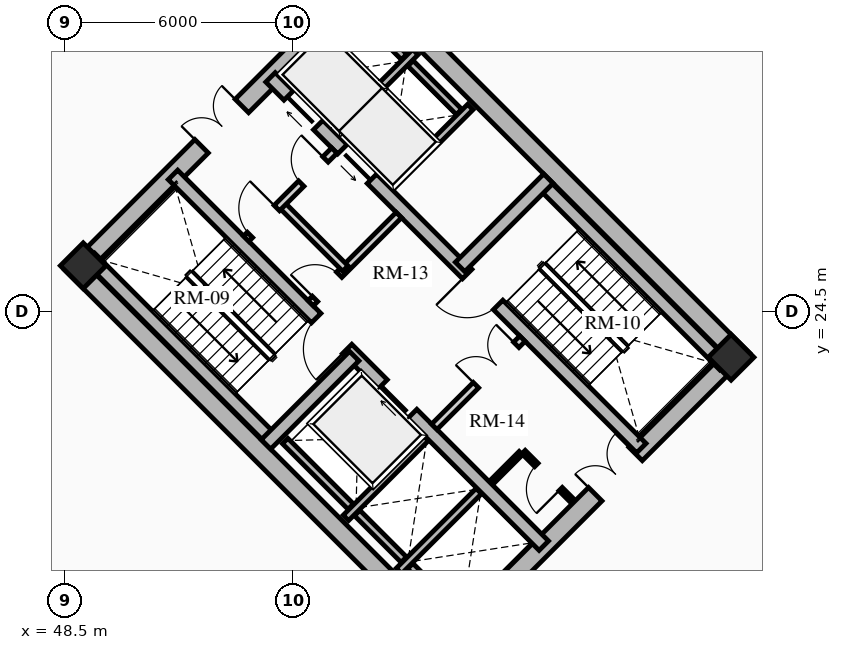
"""IFC4 building model, lengths in metres.
Left out: names, types, materials, properties, quantities, classifications, styles, units other than length and angle.
Written with IfcOpenShell. Run it as: python <this file> out.ifc"""

import sys

from ifc_helpers import new_model, si_unit, direction, frame, frame_2d, origin, origin_2d, place, context, subcontext, project, spatial, rectangle, extrude, source, transform, mapped, element, fill, save


model = new_model("IFC4")
c1 = context("Model", 3, precision=1e-05, world=origin(), true_north=direction((0.0, 1.0)))
c2 = subcontext(c1, "Body", "Model", "MODEL_VIEW")
j1 = project(units=[si_unit("LENGTHUNIT", "METRE"), si_unit("PLANEANGLEUNIT", "RADIAN")], contexts=[c1])
p1 = place(None, origin())
s1 = spatial("IfcSite", under=j1, at=p1, CompositionType="ELEMENT")
p2 = place(p1, origin())
s2 = spatial("IfcBuilding", under=s1, at=p2, CompositionType="ELEMENT")
p3 = place(p2, frame((0.0, 0.0, 9.0)))
s3 = spatial("IfcBuildingStorey", under=s2, at=p3, CompositionType="ELEMENT", Elevation=9.0)
for number, where, z_axis, x_axis in (
    (1, (58.773, 15.661, 0.0), (0.0, 0.0, 1.0), (-0.707, 0.707, 0.0)),
    (2, (66.339, 23.227, 0.0), (0.0, 0.0, 1.0), (-0.707, 0.707, 0.0)),
):
    element("IfcWall", number, at=place(p3, frame(where, z_axis=z_axis, x_axis=x_axis)), inside=s3, PredefinedType="SHEAR", context=c2, shape_type="SweptSolid", body=[
        extrude(rectangle(XDim=14.3, YDim=0.5, at=frame_2d((7.15, 0.0))), origin(), (0.0, 0.0, 1.0), 4.2),
    ])
p4 = place(p3, frame((58.596, 15.838, 0.0), z_axis=(0.0, 0.0, 1.0), x_axis=(0.707106781187, 0.707106781187, 0.0)))
e3 = element("IfcWall", 3, at=p4, inside=s3, PredefinedType="SHEAR", context=c2, shape_type="SweptSolid", body=[
    extrude(rectangle(XDim=10.7, YDim=0.5, at=frame_2d((5.35, 0.0))), origin(), (0.0, 0.0, 1.0), 4.2),
])
m1 = source(origin(), c2, "Body", "SweptSolid", [
    extrude(rectangle(XDim=1.5, YDim=2.02, at=frame_2d((0.75, 1.01))), frame((0.0, 0.26, 0.0), z_axis=(0.0, -1.0, 0.0), x_axis=(1.0, 0.0, 0.0)), (0.0, 0.0, 1.0), 0.52),
])
p5 = place(p4, frame((5.45, 0.0, 0.0)))
e4 = element("IfcOpeningElement", 4, at=p5, cuts=e3, PredefinedType="OPENING", context=c2, shape_type="MappedRepresentation", body=[
    mapped(m1, transform((0.0, 0.0, 0.0), x_axis=(1.0, 0.0, 0.0), y_axis=(0.0, 1.0, 0.0), z_axis=(0.0, 0.0, 1.0), scale=1.0)),
])
p6 = place(p3, frame((48.838, 25.596, 0.0), z_axis=(0.0, 0.0, 1.0), x_axis=(0.707106781187, 0.707106781187, 0.0)))
e5 = element("IfcWall", 5, at=p6, inside=s3, PredefinedType="SHEAR", context=c2, shape_type="SweptSolid", body=[
    extrude(rectangle(XDim=10.7, YDim=0.5, at=frame_2d((5.35, 0.0))), origin(), (0.0, 0.0, 1.0), 4.2),
])
p7 = place(p6, frame((4.6, 0.0, 0.0)))
e6 = element("IfcOpeningElement", 6, at=p7, cuts=e5, PredefinedType="OPENING", context=c2, shape_type="MappedRepresentation", body=[
    mapped(m1, transform((0.0, 0.0, 0.0), x_axis=(1.0, 0.0, 0.0), y_axis=(0.0, 1.0, 0.0), z_axis=(0.0, 0.0, 1.0), scale=1.0)),
])
p8 = place(p3, frame((61.096, 18.338, 0.0), z_axis=(0.0, 0.0, 1.0), x_axis=(-0.707106781187, 0.707106781187, 0.0)))
e7 = element("IfcWall", 7, at=p8, inside=s3, PredefinedType="SHEAR", context=c2, shape_type="SweptSolid", body=[
    extrude(rectangle(XDim=13.8, YDim=0.35, at=frame_2d((6.9, 0.0))), origin(), (0.0, 0.0, 1.0), 4.2),
])
m2 = source(origin(), c2, "Body", "SweptSolid", [
    extrude(rectangle(XDim=1.1, YDim=2.015, at=frame_2d((0.55, 1.007))), frame((0.0, 0.185, 0.0), z_axis=(0.0, -1.0, 0.0), x_axis=(1.0, 0.0, 0.0)), (0.0, 0.0, 1.0), 0.37),
])
p9 = place(p8, frame((4.9, 0.0, 0.0)))
e8 = element("IfcOpeningElement", 8, at=p9, cuts=e7, PredefinedType="OPENING", context=c2, shape_type="MappedRepresentation", body=[
    mapped(m2, transform((0.0, 0.0, 0.0), x_axis=(1.0, 0.0, 0.0), y_axis=(0.0, 1.0, 0.0), z_axis=(0.0, 0.0, 1.0), scale=1.0)),
])
m3 = source(origin(), c2, "Body", "SweptSolid", [
    extrude(rectangle(XDim=1.15, YDim=2.02, at=frame_2d((0.575, 1.01))), frame((0.0, 0.185, 0.0), z_axis=(0.0, -1.0, 0.0), x_axis=(1.0, 0.0, 0.0)), (0.0, 0.0, 1.0), 0.37),
])
p10 = place(p8, frame((7.32, 0.0, 0.0)))
e9 = element("IfcOpeningElement", 9, at=p10, cuts=e7, PredefinedType="OPENING", context=c2, shape_type="MappedRepresentation", body=[
    mapped(m3, transform((0.0, 0.0, 0.0), x_axis=(1.0, 0.0, 0.0), y_axis=(0.0, 1.0, 0.0), z_axis=(0.0, 0.0, 1.0), scale=1.0)),
])
p11 = place(p3, frame((63.662, 20.904, 0.0), z_axis=(0.0, 0.0, 1.0), x_axis=(-0.707106781187, 0.707106781187, 0.0)))
e10 = element("IfcWall", 10, at=p11, inside=s3, PredefinedType="SHEAR", context=c2, shape_type="SweptSolid", body=[
    extrude(rectangle(XDim=13.8, YDim=0.35, at=frame_2d((6.9, 0.0))), origin(), (0.0, 0.0, 1.0), 4.2),
])
p12 = place(p11, frame((10.025, 0.0, 0.0)))
e11 = element("IfcOpeningElement", 11, at=p12, cuts=e10, PredefinedType="OPENING", context=c2, shape_type="MappedRepresentation", body=[
    mapped(m2, transform((0.0, 0.0, 0.0), x_axis=(1.0, 0.0, 0.0), y_axis=(0.0, 1.0, 0.0), z_axis=(0.0, 0.0, 1.0), scale=1.0)),
])
p13 = place(p11, frame((12.025, 0.0, 0.0)))
e12 = element("IfcOpeningElement", 12, at=p13, cuts=e10, PredefinedType="OPENING", context=c2, shape_type="MappedRepresentation", body=[
    mapped(m2, transform((0.0, 0.0, 0.0), x_axis=(1.0, 0.0, 0.0), y_axis=(0.0, 1.0, 0.0), z_axis=(0.0, 0.0, 1.0), scale=1.0)),
])
p14 = place(p11, frame((5.33, 0.0, 0.0)))
e13 = element("IfcOpeningElement", 13, at=p14, cuts=e10, PredefinedType="OPENING", context=c2, shape_type="MappedRepresentation", body=[
    mapped(m3, transform((0.0, 0.0, 0.0), x_axis=(1.0, 0.0, 0.0), y_axis=(0.0, 1.0, 0.0), z_axis=(0.0, 0.0, 1.0), scale=1.0)),
])
p15 = place(p3, frame((53.922, 21.141, 0.0), z_axis=(0.0, 0.0, 1.0), x_axis=(-0.707106781187, 0.707106781187, 0.0)))
e14 = element("IfcWall", 14, at=p15, inside=s3, PredefinedType="SHEAR", context=c2, shape_type="SweptSolid", body=[
    extrude(rectangle(XDim=6.745, YDim=0.35, at=frame_2d((3.373, 0.0))), origin(), (0.0, 0.0, 1.0), 4.2),
])
p16 = place(p3, frame((53.784, 21.003, 0.0), z_axis=(0.0, 0.0, 1.0), x_axis=(0.707106781187, 0.707106781187, 0.0)))
e15 = element("IfcWall", 15, at=p16, inside=s3, PredefinedType="SHEAR", context=c2, shape_type="SweptSolid", body=[
    extrude(rectangle(XDim=3.285, YDim=0.35, at=frame_2d((1.643, 0.0))), origin(), (0.0, 0.0, 1.0), 4.2),
])
p17 = place(p3, frame((65.847, 23.089, 0.0), z_axis=(0.0, 0.0, 1.0), x_axis=(-0.707106781187, 0.707106781187, 0.0)))
e16 = element("IfcWall", 16, at=p17, inside=s3, PredefinedType="SHEAR", context=c2, shape_type="SweptSolid", body=[
    extrude(rectangle(XDim=6.745, YDim=0.35, at=frame_2d((3.373, 0.0))), origin(), (0.0, 0.0, 1.0), 4.2),
])
p18 = place(p3, frame((58.893, 25.674, 0.0), z_axis=(0.0, 0.0, 1.0), x_axis=(0.707106781187, 0.707106781187, 0.0)))
e17 = element("IfcWall", 17, at=p18, inside=s3, PredefinedType="SHEAR", context=c2, shape_type="SweptSolid", body=[
    extrude(rectangle(XDim=3.285, YDim=0.35, at=frame_2d((1.643, 0.0))), origin(), (0.0, 0.0, 1.0), 4.2),
])
for number, where, z_axis, x_axis in (
    (18, (48.976, 25.706, 0.0), (0.0, 0.0, 1.0), (0.707, 0.707, 0.0)),
    (19, (66.024, 23.294, 0.0), (0.0, 0.0, 1.0), (0.707, 0.707, 0.0)),
):
    element("IfcColumn", number, at=place(p3, frame(where, z_axis=z_axis, x_axis=x_axis)), inside=s3, PredefinedType="COLUMN", context=c2, shape_type="SweptSolid", body=[
        extrude(rectangle(XDim=0.85, YDim=0.85, at=origin_2d()), origin(), (0.0, 0.0, 1.0), 4.2),
    ])
p19 = place(p3, frame((55.888, 19.069, 0.0), z_axis=(0.0, 0.0, 1.0), x_axis=(0.707106781187, 0.707106781187, 0.0)))
e20 = element("IfcWall", 20, at=p19, inside=s3, PredefinedType="SHEAR", context=c2, shape_type="SweptSolid", body=[
    extrude(rectangle(XDim=2.97, YDim=0.2, at=frame_2d((1.485, 0.0))), origin(), (0.0, 0.0, 1.0), 4.2),
])
p20 = place(p3, frame((56.015, 19.366, 0.0), z_axis=(0.0, 0.0, 1.0), x_axis=(-0.707106781187, 0.707106781187, 0.0)))
e21 = element("IfcWall", 21, at=p20, inside=s3, PredefinedType="SHEAR", context=c2, shape_type="SweptSolid", body=[
    extrude(rectangle(XDim=2.44, YDim=0.2, at=frame_2d((1.22, 0.0))), origin(), (0.0, 0.0, 1.0), 4.2),
])
p21 = place(p3, frame((57.284, 17.673, 0.0), z_axis=(0.0, 0.0, 1.0), x_axis=(0.707147878904, 0.70706568108, 0.0)))
e22 = element("IfcWall", 22, at=p21, inside=s3, PredefinedType="SHEAR", context=c2, shape_type="SweptSolid", body=[
    extrude(rectangle(XDim=2.97, YDim=0.2, at=frame_2d((1.485, 0.0))), origin(), (0.0, 0.0, 1.0), 4.2),
])
p22 = place(p3, frame((57.412, 17.97, 0.0), z_axis=(0.0, 0.0, 1.0), x_axis=(-0.707106781187, 0.707106781187, 0.0)))
e23 = element("IfcWall", 23, at=p22, inside=s3, PredefinedType="SHEAR", context=c2, shape_type="SweptSolid", body=[
    extrude(rectangle(XDim=1.735, YDim=0.2, at=frame_2d((0.867, 0.0))), origin(), (0.0, 0.0, 1.0), 4.2),
])
p23 = place(p3, frame((58.737, 16.644, 0.0), z_axis=(0.0, 0.0, 1.0), x_axis=(-0.707032117043, 0.707181437447, 0.0)))
e24 = element("IfcWall", 24, at=p23, inside=s3, PredefinedType="SHEAR", context=c2, shape_type="SweptSolid", body=[
    extrude(rectangle(XDim=1.635, YDim=0.2, at=frame_2d((0.817, 0.0))), origin(), (0.0, 0.0, 1.0), 4.2),
])
p24 = place(p3, frame((57.062, 27.781, 0.0), z_axis=(0.0, 0.0, 1.0), x_axis=(0.707106781187, 0.707106781187, 0.0)))
e25 = element("IfcWall", 25, at=p24, inside=s3, PredefinedType="SHEAR", context=c2, shape_type="SweptSolid", body=[
    extrude(rectangle(XDim=2.97, YDim=0.2, at=frame_2d((1.485, 0.0))), origin(), (0.0, 0.0, 1.0), 4.2),
])
p25 = place(p3, frame((55.615, 29.227, 0.0), z_axis=(0.0, 0.0, 1.0), x_axis=(0.707147878904, 0.70706568108, 0.0)))
e26 = element("IfcWall", 26, at=p25, inside=s3, PredefinedType="SHEAR", context=c2, shape_type="SweptSolid", body=[
    extrude(rectangle(XDim=2.97, YDim=0.2, at=frame_2d((1.485, 0.0))), origin(), (0.0, 0.0, 1.0), 4.2),
])
p26 = place(p3, frame((58.865, 29.754, 0.0), z_axis=(0.0, 0.0, 1.0), x_axis=(-0.707174411312, 0.707039144592, 0.0)))
e27 = element("IfcWall", 27, at=p26, inside=s3, PredefinedType="SHEAR", context=c2, shape_type="SweptSolid", body=[
    extrude(rectangle(XDim=1.805, YDim=0.2, at=frame_2d((0.902, 0.0))), origin(), (0.0, 0.0, 1.0), 4.2),
])
p27 = place(p3, frame((57.419, 31.2, 0.0), z_axis=(0.0, 0.0, 1.0), x_axis=(-0.707032117043, 0.707181437447, 0.0)))
e28 = element("IfcWall", 28, at=p27, inside=s3, PredefinedType="SHEAR", context=c2, shape_type="SweptSolid", body=[
    extrude(rectangle(XDim=1.635, YDim=0.2, at=frame_2d((0.817, 0.0))), origin(), (0.0, 0.0, 1.0), 4.2),
])
p28 = place(p3, frame((58.214, 21.467, 0.0), z_axis=(0.0, 0.0, 1.0), x_axis=(0.707106781187, 0.707106781187, 0.0)))
e29 = element("IfcWall", 29, at=p28, inside=s3, PredefinedType="PARTITIONING", context=c2, shape_type="SweptSolid", body=[
    extrude(rectangle(XDim=3.28, YDim=0.2, at=frame_2d((1.64, 0.0))), origin(), (0.0, 0.0, 1.0), 3.885),
])
m4 = source(origin(), c2, "Body", "SweptSolid", [
    extrude(rectangle(XDim=1.5, YDim=2.02, at=frame_2d((0.75, 1.01))), frame((0.0, 0.11, 0.0), z_axis=(0.0, -1.0, 0.0), x_axis=(1.0, 0.0, 0.0)), (0.0, 0.0, 1.0), 0.22),
])
p29 = place(p28, frame((1.55, 0.0, 0.0)))
e30 = element("IfcOpeningElement", 30, at=p29, cuts=e29, PredefinedType="OPENING", context=c2, shape_type="MappedRepresentation", body=[
    mapped(m4, transform((0.0, 0.0, 0.0), x_axis=(1.0, 0.0, 0.0), y_axis=(0.0, 1.0, 0.0), z_axis=(0.0, 0.0, 1.0), scale=1.0)),
])
p30 = place(p3, frame((54.961, 24.719, 0.0), z_axis=(0.0, 0.0, 1.0), x_axis=(0.707106781187, 0.707106781187, 0.0)))
e31 = element("IfcWall", 31, at=p30, inside=s3, PredefinedType="PARTITIONING", context=c2, shape_type="SweptSolid", body=[
    extrude(rectangle(XDim=3.28, YDim=0.2, at=frame_2d((1.64, 0.0))), origin(), (0.0, 0.0, 1.0), 3.885),
])
m5 = source(origin(), c2, "Body", "SweptSolid", [
    extrude(rectangle(XDim=0.9, YDim=2.005, at=frame_2d((0.45, 1.002))), frame((0.0, 0.11, 0.0), z_axis=(0.0, -1.0, 0.0), x_axis=(1.0, 0.0, 0.0)), (0.0, 0.0, 1.0), 0.22),
])
p31 = place(p30, frame((0.16, 0.0, 0.0)))
e32 = element("IfcOpeningElement", 32, at=p31, cuts=e31, PredefinedType="OPENING", context=c2, shape_type="MappedRepresentation", body=[
    mapped(m5, transform((0.0, 0.0, 0.0), x_axis=(1.0, 0.0, 0.0), y_axis=(0.0, 1.0, 0.0), z_axis=(0.0, 0.0, 1.0), scale=1.0)),
])
p32 = place(p3, frame((55.874, 25.631, 0.0), z_axis=(0.0, 0.0, 1.0), x_axis=(-0.707157639372, 0.707055919343, 0.0)))
e33 = element("IfcWall", 33, at=p32, inside=s3, PredefinedType="PARTITIONING", context=c2, shape_type="SweptSolid", body=[
    extrude(rectangle(XDim=2.4, YDim=0.2, at=frame_2d((1.2, 0.0))), origin(), (0.0, 0.0, 1.0), 3.885),
])
p33 = place(p3, frame((53.264, 26.416, 0.0), z_axis=(0.0, 0.0, 1.0), x_axis=(0.707106781187, 0.707106781187, 0.0)))
e34 = element("IfcWall", 34, at=p33, inside=s3, PredefinedType="PARTITIONING", context=c2, shape_type="SweptSolid", body=[
    extrude(rectangle(XDim=3.28, YDim=0.2, at=frame_2d((1.64, 0.0))), origin(), (0.0, 0.0, 1.0), 3.885),
])
m6 = source(origin(), c2, "Body", "SweptSolid", [
    extrude(rectangle(XDim=1.0, YDim=2.015, at=frame_2d((0.5, 1.007))), frame((0.0, 0.11, 0.0), z_axis=(0.0, -1.0, 0.0), x_axis=(1.0, 0.0, 0.0)), (0.0, 0.0, 1.0), 0.22),
])
p34 = place(p33, frame((0.14, 0.0, 0.0)))
e35 = element("IfcOpeningElement", 35, at=p34, cuts=e34, PredefinedType="OPENING", context=c2, shape_type="MappedRepresentation", body=[
    mapped(m6, transform((0.0, 0.0, 0.0), x_axis=(1.0, 0.0, 0.0), y_axis=(0.0, 1.0, 0.0), z_axis=(0.0, 0.0, 1.0), scale=1.0)),
])
p35 = place(p33, frame((2.05, 0.0, 0.0)))
e36 = element("IfcOpeningElement", 36, at=p35, cuts=e34, PredefinedType="OPENING", context=c2, shape_type="MappedRepresentation", body=[
    mapped(m5, transform((0.0, 0.0, 0.0), x_axis=(1.0, 0.0, 0.0), y_axis=(0.0, 1.0, 0.0), z_axis=(0.0, 0.0, 1.0), scale=1.0)),
])
p36 = place(p3, frame((61.835, 19.529, 0.0), z_axis=(0.0, 0.0, 1.0), x_axis=(-0.707174592913, 0.707038962956, 0.0)))
e37 = element("IfcWall", 37, at=p36, inside=s3, PredefinedType="PARTITIONING", context=c2, shape_type="SweptSolid", body=[
    extrude(rectangle(XDim=1.8, YDim=0.125, at=frame_2d((0.9, 0.0))), origin(), (0.0, 0.0, 1.0), 3.885),
])
m7 = source(origin(), c2, "Body", "SweptSolid", [
    extrude(rectangle(XDim=0.9, YDim=2.005, at=frame_2d((0.45, 1.002))), frame((0.0, 0.073, 0.0), z_axis=(0.0, -1.0, 0.0), x_axis=(1.0, 0.0, 0.0)), (0.0, 0.0, 1.0), 0.145),
])
p37 = place(p36, frame((0.42, 0.0, 0.0)))
e38 = element("IfcOpeningElement", 38, at=p37, cuts=e37, PredefinedType="OPENING", context=c2, shape_type="MappedRepresentation", body=[
    mapped(m7, transform((0.0, 0.0, 0.0), x_axis=(1.0, 0.0, 0.0), y_axis=(0.0, 1.0, 0.0), z_axis=(0.0, 0.0, 1.0), scale=1.0)),
])
p38 = place(p3, frame((59.713, 19.996, 0.0), z_axis=(0.0, 0.0, 1.0), x_axis=(0.707217726, 0.706995818963, 0.0)))
e39 = element("IfcWall", 39, at=p38, inside=s3, PredefinedType="PARTITIONING", context=c2, shape_type="SweptSolid", body=[
    extrude(rectangle(XDim=1.1, YDim=0.125, at=frame_2d((0.55, 0.0))), origin(), (0.0, 0.0, 1.0), 3.885),
])
m8 = source(origin(), c2, "Body", "SweptSolid", [
    extrude(rectangle(XDim=1.1, YDim=2.015, at=frame_2d((0.55, 1.007))), frame((0.0, 0.025, 0.0), z_axis=(0.0, -1.0, 0.0), x_axis=(1.0, 0.0, 0.0)), (0.0, 0.0, 1.0), 0.05),
])
p39 = place(p9, origin())
e40 = element("IfcDoor", 40, at=p39, inside=s3, OperationType="SLIDING_TO_RIGHT", PredefinedType="DOOR", context=c2, shape_type="MappedRepresentation", body=[
    mapped(m8, transform((0.0, 0.0, 0.0), x_axis=(1.0, 0.0, 0.0), y_axis=(0.0, 1.0, 0.0), z_axis=(0.0, 0.0, 1.0), scale=1.0)),
])
fill(e8, e40)
p40 = place(p12, origin())
e41 = element("IfcDoor", 41, at=p40, inside=s3, OperationType="SLIDING_TO_LEFT", PredefinedType="DOOR", context=c2, shape_type="MappedRepresentation", body=[
    mapped(m8, transform((0.0, 0.0, 0.0), x_axis=(1.0, 0.0, 0.0), y_axis=(0.0, 1.0, 0.0), z_axis=(0.0, 0.0, 1.0), scale=1.0)),
])
fill(e11, e41)
p41 = place(p13, origin())
e42 = element("IfcDoor", 42, at=p41, inside=s3, OperationType="SLIDING_TO_RIGHT", PredefinedType="DOOR", context=c2, shape_type="MappedRepresentation", body=[
    mapped(m8, transform((0.0, 0.0, 0.0), x_axis=(1.0, 0.0, 0.0), y_axis=(0.0, 1.0, 0.0), z_axis=(0.0, 0.0, 1.0), scale=1.0)),
])
fill(e12, e42)
m9 = source(origin(), c2, "Body", "SweptSolid", [
    extrude(rectangle(XDim=1.15, YDim=2.02, at=frame_2d((0.575, 1.01))), frame((0.0, 0.025, 0.0), z_axis=(0.0, -1.0, 0.0), x_axis=(1.0, 0.0, 0.0)), (0.0, 0.0, 1.0), 0.05),
])
p42 = place(p10, origin())
e43 = element("IfcDoor", 43, at=p42, inside=s3, OperationType="SINGLE_SWING_LEFT", PredefinedType="DOOR", context=c2, shape_type="MappedRepresentation", body=[
    mapped(m9, transform((0.0, 0.0, 0.0), x_axis=(1.0, 0.0, 0.0), y_axis=(0.0, 1.0, 0.0), z_axis=(0.0, 0.0, 1.0), scale=1.0)),
])
fill(e9, e43)
p43 = place(p14, origin())
e44 = element("IfcDoor", 44, at=p43, inside=s3, OperationType="SINGLE_SWING_RIGHT", PredefinedType="DOOR", context=c2, shape_type="MappedRepresentation", body=[
    mapped(m9, transform((0.0, 0.0, 0.0), x_axis=(1.0, 0.0, 0.0), y_axis=(0.0, 1.0, 0.0), z_axis=(0.0, 0.0, 1.0), scale=1.0)),
])
fill(e13, e44)
m10 = source(origin(), c2, "Body", "SweptSolid", [
    extrude(rectangle(XDim=1.5, YDim=2.02, at=frame_2d((0.75, 1.01))), frame((0.0, 0.025, 0.0), z_axis=(0.0, -1.0, 0.0), x_axis=(1.0, 0.0, 0.0)), (0.0, 0.0, 1.0), 0.05),
])
p44 = place(p7, origin())
e45 = element("IfcDoor", 45, at=p44, inside=s3, OperationType="DOUBLE_DOOR_SINGLE_SWING", PredefinedType="DOOR", context=c2, shape_type="MappedRepresentation", body=[
    mapped(m10, transform((0.0, 0.0, 0.0), x_axis=(1.0, 0.0, 0.0), y_axis=(0.0, 1.0, 0.0), z_axis=(0.0, 0.0, 1.0), scale=1.0)),
])
fill(e6, e45)
p45 = place(p5, origin())
e46 = element("IfcDoor", 46, at=p45, inside=s3, OperationType="DOUBLE_DOOR_SINGLE_SWING", PredefinedType="DOOR", context=c2, shape_type="MappedRepresentation", body=[
    mapped(m10, transform((0.0, 0.0, 0.0), x_axis=(1.0, 0.0, 0.0), y_axis=(0.0, 1.0, 0.0), z_axis=(0.0, 0.0, 1.0), scale=1.0)),
])
fill(e4, e46)
p46 = place(p29, origin())
e47 = element("IfcDoor", 47, at=p46, inside=s3, OperationType="DOUBLE_DOOR_SINGLE_SWING", PredefinedType="DOOR", context=c2, shape_type="MappedRepresentation", body=[
    mapped(m10, transform((0.0, 0.0, 0.0), x_axis=(1.0, 0.0, 0.0), y_axis=(0.0, 1.0, 0.0), z_axis=(0.0, 0.0, 1.0), scale=1.0)),
])
fill(e30, e47)
m11 = source(origin(), c2, "Body", "SweptSolid", [
    extrude(rectangle(XDim=0.9, YDim=2.005, at=frame_2d((0.45, 1.002))), frame((0.0, 0.025, 0.0), z_axis=(0.0, -1.0, 0.0), x_axis=(1.0, 0.0, 0.0)), (0.0, 0.0, 1.0), 0.05),
])
p47 = place(p31, origin())
e48 = element("IfcDoor", 48, at=p47, inside=s3, OperationType="SINGLE_SWING_LEFT", PredefinedType="DOOR", context=c2, shape_type="MappedRepresentation", body=[
    mapped(m11, transform((0.0, 0.0, 0.0), x_axis=(1.0, 0.0, 0.0), y_axis=(0.0, 1.0, 0.0), z_axis=(0.0, 0.0, 1.0), scale=1.0)),
])
fill(e32, e48)
m12 = source(origin(), c2, "Body", "SweptSolid", [
    extrude(rectangle(XDim=1.0, YDim=2.015, at=frame_2d((0.5, 1.007))), frame((0.0, 0.025, 0.0), z_axis=(0.0, -1.0, 0.0), x_axis=(1.0, 0.0, 0.0)), (0.0, 0.0, 1.0), 0.05),
])
p48 = place(p34, origin())
e49 = element("IfcDoor", 49, at=p48, inside=s3, OperationType="SINGLE_SWING_RIGHT", PredefinedType="DOOR", context=c2, shape_type="MappedRepresentation", body=[
    mapped(m12, transform((0.0, 0.0, 0.0), x_axis=(1.0, 0.0, 0.0), y_axis=(0.0, 1.0, 0.0), z_axis=(0.0, 0.0, 1.0), scale=1.0)),
])
fill(e35, e49)
p49 = place(p37, origin())
e50 = element("IfcDoor", 50, at=p49, inside=s3, OperationType="SINGLE_SWING_LEFT", PredefinedType="DOOR", context=c2, shape_type="MappedRepresentation", body=[
    mapped(m11, transform((0.0, 0.0, 0.0), x_axis=(1.0, 0.0, 0.0), y_axis=(0.0, 1.0, 0.0), z_axis=(0.0, 0.0, 1.0), scale=1.0)),
])
fill(e38, e50)
p50 = place(p35, origin())
e51 = element("IfcDoor", 51, at=p50, inside=s3, OperationType="SINGLE_SWING_RIGHT", PredefinedType="DOOR", context=c2, shape_type="MappedRepresentation", body=[
    mapped(m11, transform((0.0, 0.0, 0.0), x_axis=(1.0, 0.0, 0.0), y_axis=(0.0, 1.0, 0.0), z_axis=(0.0, 0.0, 1.0), scale=1.0)),
])
fill(e36, e51)
save(model, sys.argv[1])
